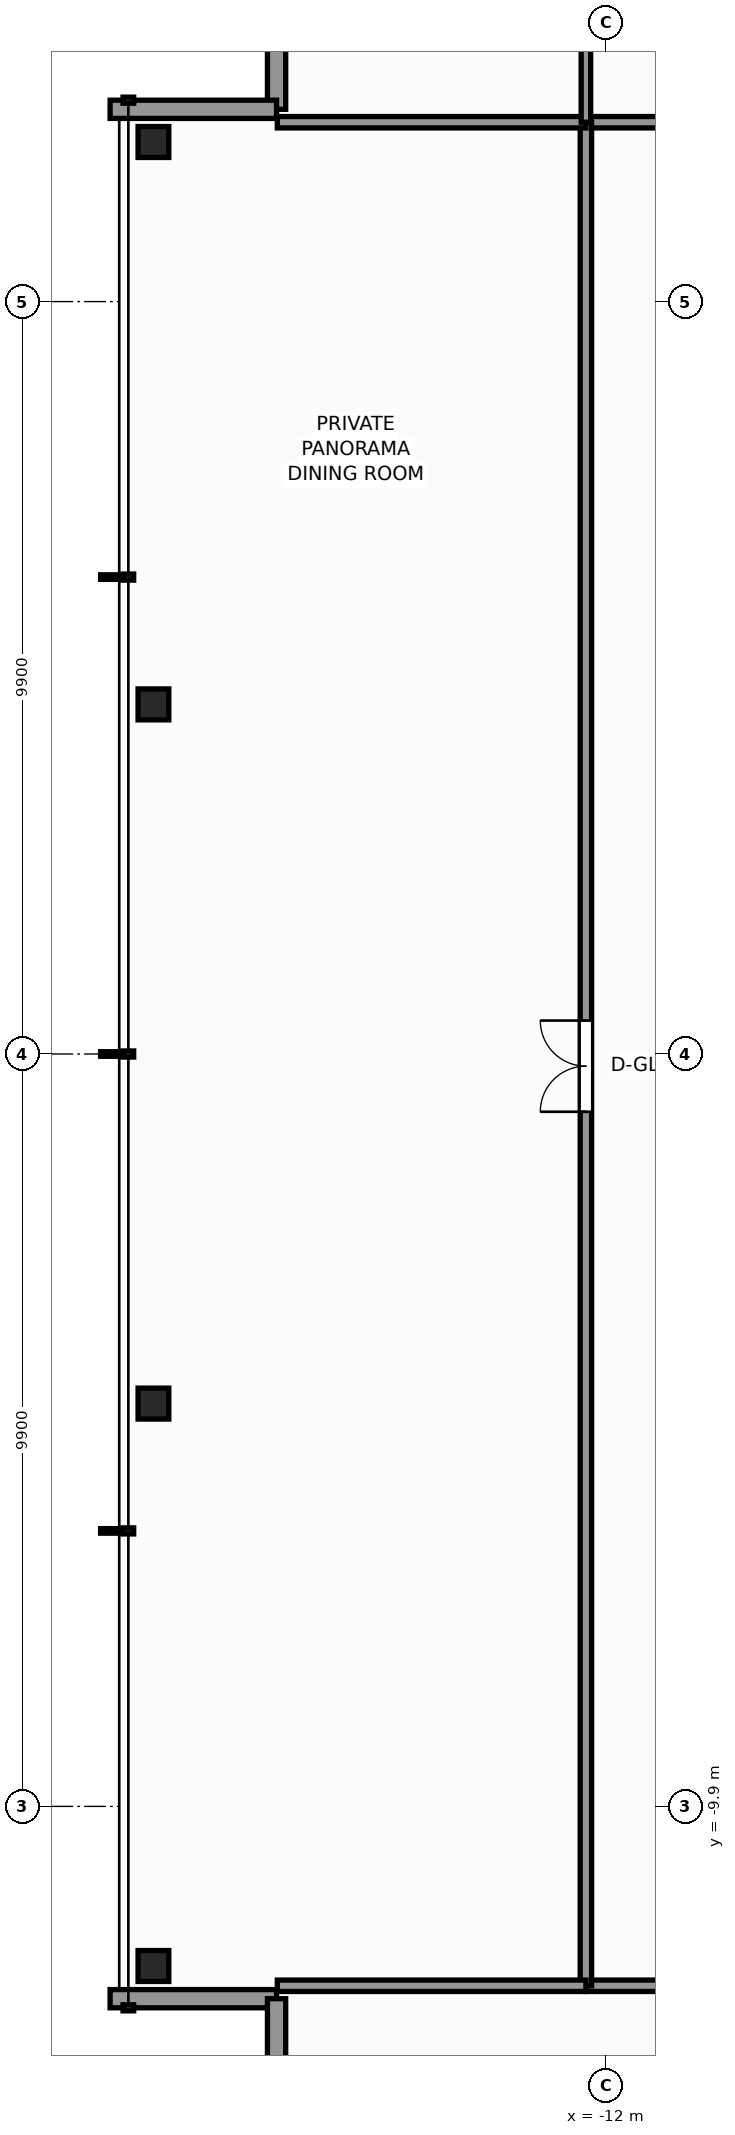
"""IFC4 building model, lengths in metres.
Left out: names, types, materials, properties, quantities, classifications, styles, units other than length and angle.
Written with IfcOpenShell. Run it as: python <this file> out.ifc"""

import sys

from ifc_helpers import new_model, si_unit, direction, frame, frame_2d, origin, origin_2d, place, context, subcontext, project, spatial, rectangle, i_section, extrude, element, fill, save


model = new_model("IFC4")
c1 = context("Model", 3, precision=1e-05, world=origin(), true_north=direction((0.0, 1.0)))
c2 = subcontext(c1, "Body", "Model", "MODEL_VIEW")
j1 = project(units=[si_unit("LENGTHUNIT", "METRE"), si_unit("PLANEANGLEUNIT", "RADIAN")], contexts=[c1])
p1 = place(None, origin())
s1 = spatial("IfcSite", under=j1, at=p1, CompositionType="ELEMENT")
p2 = place(p1, origin())
s2 = spatial("IfcBuilding", under=s1, at=p2, CompositionType="ELEMENT")
p3 = place(p2, frame((0.0, 0.0, 262.8)))
s3 = spatial("IfcBuildingStorey", under=s2, at=p3, CompositionType="ELEMENT", Elevation=262.8)
for number, where, z_axis, x_axis in (
    (1, (-17.95, -12.0, 0.0), (0.0, 0.0, 1.0), (1.0, 0.0, 0.0)),
    (2, (-17.95, -4.6, 0.0), (0.0, 0.0, 1.0), (1.0, 0.0, 0.0)),
    (3, (-17.95, 4.6, 0.0), (0.0, 0.0, 1.0), (1.0, 0.0, 0.0)),
    (4, (-17.95, 12.0, 0.0), (0.0, 0.0, 1.0), (1.0, 0.0, 0.0)),
):
    element("IfcColumn", number, at=place(p3, frame(where, z_axis=z_axis, x_axis=x_axis)), inside=s3, PredefinedType="COLUMN", context=c2, shape_type="SweptSolid", body=[
        extrude(i_section(OverallWidth=0.404, OverallDepth=0.407, WebThickness=0.027, FlangeThickness=0.044, FilletRadius=0.025, at=origin_2d()), origin(), (0.0, 0.0, 1.0), 4.6),
    ])
p4 = place(p3, frame((-16.33, 12.43, 0.0), z_axis=(0.0, 0.0, 1.0), x_axis=(0.0, 1.0, 0.0)))
e5 = element("IfcWall", 5, at=p4, inside=s3, PredefinedType="STANDARD", context=c2, shape_type="SweptSolid", body=[
    extrude(rectangle(XDim=2.19, YDim=0.24, at=frame_2d((1.095, 0.0))), origin(), (0.0, 0.0, 1.0), 3.703),
])
for number, where, z_axis, x_axis in (
    (6, (-18.52, 12.43, 0.0), (0.0, 0.0, 1.0), (1.0, 0.0, 0.0)),
    (7, (-16.33, -12.43, 0.0), (0.0, 0.0, 1.0), (-1.0, 0.0, 0.0)),
):
    element("IfcWall", number, at=place(p3, frame(where, z_axis=z_axis, x_axis=x_axis)), inside=s3, PredefinedType="STANDARD", context=c2, shape_type="SweptSolid", body=[
        extrude(rectangle(XDim=2.19, YDim=0.24, at=frame_2d((1.095, 0.0))), origin(), (0.0, 0.0, 1.0), 3.703),
    ])
p5 = place(p3, frame((-16.33, -14.62, 0.0), z_axis=(0.0, 0.0, 1.0), x_axis=(0.0, 1.0, 0.0)))
e8 = element("IfcWall", 8, at=p5, inside=s3, PredefinedType="STANDARD", context=c2, shape_type="SweptSolid", body=[
    extrude(rectangle(XDim=2.19, YDim=0.24, at=frame_2d((1.095, 0.0))), origin(), (0.0, 0.0, 1.0), 3.703),
])
p6 = place(p3, frame((-12.26, -12.26, 0.0), z_axis=(0.0, 0.0, 1.0), x_axis=(1.0, 0.0, 0.0)))
e9 = element("IfcWall", 9, at=p6, inside=s3, PredefinedType="PARTITIONING", context=c2, shape_type="SweptSolid", body=[
    extrude(rectangle(XDim=24.52, YDim=0.15, at=frame_2d((12.26, 0.0))), origin(), (0.0, 0.0, 1.0), 3.609),
])
p7 = place(p6, frame((3.6, 0.0, 0.0)))
e10 = element("IfcOpeningElement", 10, at=p7, cuts=e9, PredefinedType="OPENING", context=c2, shape_type="SweptSolid", body=[
    extrude(rectangle(XDim=1.6, YDim=2.3, at=frame_2d((0.8, 1.15))), frame((0.0, 0.085, 0.0), z_axis=(0.0, -1.0, 0.0), x_axis=(1.0, 0.0, 0.0)), (0.0, 0.0, 1.0), 0.17),
])
p8 = place(p6, frame((19.06, 0.0, 0.0)))
e11 = element("IfcOpeningElement", 11, at=p8, cuts=e9, PredefinedType="OPENING", context=c2, shape_type="SweptSolid", body=[
    extrude(rectangle(XDim=1.2, YDim=2.2, at=frame_2d((0.6, 1.1))), frame((0.0, 0.085, 0.0), z_axis=(0.0, -1.0, 0.0), x_axis=(1.0, 0.0, 0.0)), (0.0, 0.0, 1.0), 0.17),
])
p9 = place(p3, frame((-12.26, 12.26, 0.0), z_axis=(0.0, 0.0, 1.0), x_axis=(1.0, 0.0, 0.0)))
e12 = element("IfcWall", 12, at=p9, inside=s3, PredefinedType="PARTITIONING", context=c2, shape_type="SweptSolid", body=[
    extrude(rectangle(XDim=24.52, YDim=0.15, at=frame_2d((12.26, 0.0))), origin(), (0.0, 0.0, 1.0), 3.609),
])
p10 = place(p9, frame((1.8, 0.0, 0.0)))
e13 = element("IfcOpeningElement", 13, at=p10, cuts=e12, PredefinedType="OPENING", context=c2, shape_type="SweptSolid", body=[
    extrude(rectangle(XDim=0.95, YDim=2.06, at=frame_2d((0.475, 1.03))), frame((0.0, 0.085, 0.0), z_axis=(0.0, -1.0, 0.0), x_axis=(1.0, 0.0, 0.0)), (0.0, 0.0, 1.0), 0.17),
])
p11 = place(p9, frame((10.5, 0.0, 0.0)))
e14 = element("IfcOpeningElement", 14, at=p11, cuts=e12, PredefinedType="OPENING", context=c2, shape_type="SweptSolid", body=[
    extrude(rectangle(XDim=1.6, YDim=2.3, at=frame_2d((0.8, 1.15))), frame((0.0, 0.085, 0.0), z_axis=(0.0, -1.0, 0.0), x_axis=(1.0, 0.0, 0.0)), (0.0, 0.0, 1.0), 0.17),
])
p12 = place(p3, frame((-12.26, -12.26, 0.0), z_axis=(0.0, 0.0, 1.0), x_axis=(0.0, 1.0, 0.0)))
e15 = element("IfcWall", 15, at=p12, inside=s3, PredefinedType="PARTITIONING", context=c2, shape_type="SweptSolid", body=[
    extrude(rectangle(XDim=24.52, YDim=0.15, at=frame_2d((12.26, 0.0))), origin(), (0.0, 0.0, 1.0), 3.609),
])
p13 = place(p12, frame((11.5, 0.0, 0.0)))
e16 = element("IfcOpeningElement", 16, at=p13, cuts=e15, PredefinedType="OPENING", context=c2, shape_type="SweptSolid", body=[
    extrude(rectangle(XDim=1.2, YDim=2.2, at=frame_2d((0.6, 1.1))), frame((0.0, 0.085, 0.0), z_axis=(0.0, -1.0, 0.0), x_axis=(1.0, 0.0, 0.0)), (0.0, 0.0, 1.0), 0.17),
])
for number, where, z_axis, x_axis in (
    (17, (-16.32, -12.26, 0.0), (0.0, 0.0, 1.0), (1.0, 0.0, 0.0)),
    (18, (-16.32, 12.26, 0.0), (0.0, 0.0, 1.0), (1.0, 0.0, 0.0)),
):
    element("IfcWall", number, at=place(p3, frame(where, z_axis=z_axis, x_axis=x_axis)), inside=s3, PredefinedType="PARTITIONING", context=c2, shape_type="SweptSolid", body=[
        extrude(rectangle(XDim=4.06, YDim=0.15, at=frame_2d((2.03, 0.0))), origin(), (0.0, 0.0, 1.0), 4.32),
    ])
p14 = place(p3, frame((-12.26, 12.26, 0.0), z_axis=(0.0, 0.0, 1.0), x_axis=(0.0, 1.0, 0.0)))
e19 = element("IfcWall", 19, at=p14, inside=s3, PredefinedType="PARTITIONING", context=c2, shape_type="SweptSolid", body=[
    extrude(rectangle(XDim=4.04, YDim=0.125, at=frame_2d((2.02, 0.0))), origin(), (0.0, 0.0, 1.0), 4.32),
])
p15 = place(p13, origin())
e20 = element("IfcDoor", 20, at=p15, inside=s3, OperationType="DOUBLE_DOOR_SINGLE_SWING", PredefinedType="DOOR", context=c2, shape_type="SweptSolid", body=[
    extrude(rectangle(XDim=1.2, YDim=2.2, at=frame_2d((0.6, 1.1))), frame((0.0, 0.025, 0.0), z_axis=(0.0, -1.0, 0.0), x_axis=(1.0, 0.0, 0.0)), (0.0, 0.0, 1.0), 0.05),
])
fill(e16, e20)
save(model, sys.argv[1])
